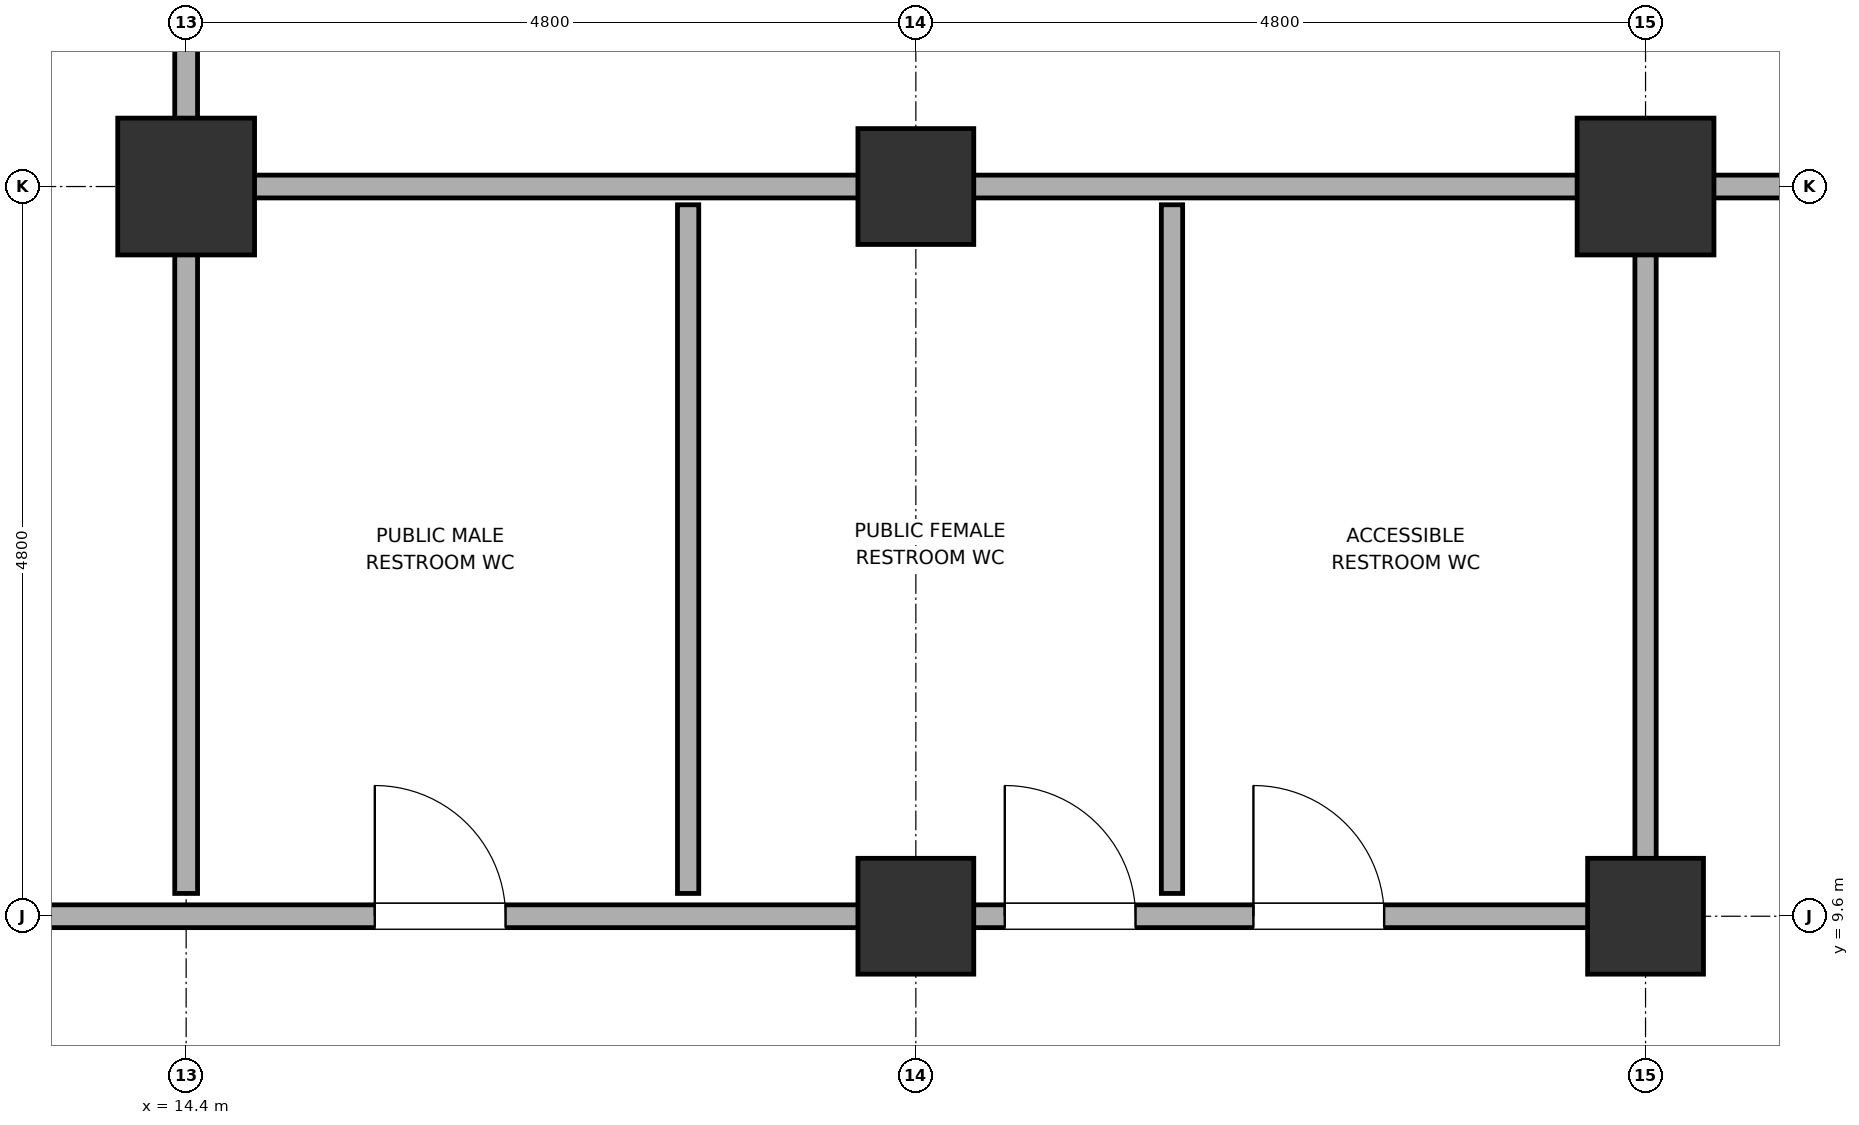
"""IFC4 building model, lengths in metres.
Left out: names, types, materials, properties, quantities, classifications, styles, units other than length and angle.
Written with IfcOpenShell. Run it as: python <this file> out.ifc"""

import sys

from ifc_helpers import new_model, si_unit, direction, frame, frame_2d, origin, origin_2d, place, context, subcontext, project, spatial, rectangle, hollow_rectangle, hollow_circle, extrude, element, fill, save


model = new_model("IFC4")
c1 = context("Model", 3, precision=1e-05, world=origin(), true_north=direction((0.0, 1.0)))
c2 = subcontext(c1, "Body", "Model", "MODEL_VIEW")
j1 = project(units=[si_unit("LENGTHUNIT", "METRE"), si_unit("PLANEANGLEUNIT", "RADIAN")], contexts=[c1])
p1 = place(None, origin())
s1 = spatial("IfcSite", under=j1, at=p1, CompositionType="ELEMENT")
p2 = place(p1, origin())
s2 = spatial("IfcBuilding", under=s1, at=p2, CompositionType="ELEMENT")
p3 = place(p2, frame((0.0, 0.0, 12.0)))
s3 = spatial("IfcBuildingStorey", under=s2, at=p3, CompositionType="ELEMENT", Elevation=12.0)
p4 = place(p3, frame((14.4, 14.4, 0.0), z_axis=(0.0, 0.0, 1.0), x_axis=(1.0, 0.0, 0.0)))
e1 = element("IfcColumn", 1, at=p4, inside=s3, PredefinedType="COLUMN", context=c2, shape_type="SweptSolid", body=[
    extrude(hollow_rectangle(XDim=0.9, YDim=0.9, WallThickness=0.04, at=origin_2d()), origin(), (0.0, 0.0, 1.0), 7.2),
])
for number, where, z_axis, x_axis in (
    (2, (19.2, 9.6, 0.0), (0.0, 0.0, 1.0), (1.0, 0.0, 0.0)),
    (3, (19.2, 14.4, 0.0), (0.0, 0.0, 1.0), (1.0, 0.0, 0.0)),
    (4, (24.0, 9.6, 0.0), (0.0, 0.0, 1.0), (1.0, 0.0, 0.0)),
):
    element("IfcColumn", number, at=place(p3, frame(where, z_axis=z_axis, x_axis=x_axis)), inside=s3, PredefinedType="COLUMN", context=c2, shape_type="SweptSolid", body=[
        extrude(hollow_circle(Radius=0.381, WallThickness=0.032, at=origin_2d()), origin(), (0.0, 0.0, 1.0), 7.2),
    ])
p5 = place(p3, frame((24.0, 14.4, 0.0), z_axis=(0.0, 0.0, 1.0), x_axis=(1.0, 0.0, 0.0)))
e5 = element("IfcColumn", 5, at=p5, inside=s3, PredefinedType="COLUMN", context=c2, shape_type="SweptSolid", body=[
    extrude(hollow_rectangle(XDim=0.9, YDim=0.9, WallThickness=0.04, at=origin_2d()), origin(), (0.0, 0.0, 1.0), 7.2),
])
p6 = place(p3, frame((-32.4, 9.6, 0.0), z_axis=(0.0, 0.0, 1.0), x_axis=(1.0, 0.0, 0.0)))
e6 = element("IfcWall", 6, at=p6, inside=s3, PredefinedType="PARTITIONING", context=c2, shape_type="SweptSolid", body=[
    extrude(rectangle(XDim=56.28, YDim=0.15, at=frame_2d((28.14, 0.0))), origin(), (0.0, 0.0, 1.0), 5.52),
])
p7 = place(p6, frame((15.15, 0.0, 0.0)))
e7 = element("IfcOpeningElement", 7, at=p7, cuts=e6, PredefinedType="OPENING", context=c2, shape_type="SweptSolid", body=[
    extrude(rectangle(XDim=0.9, YDim=2.1, at=frame_2d((0.45, 1.05))), frame((0.0, 0.09, 0.0), z_axis=(0.0, -1.0, 0.0), x_axis=(1.0, 0.0, 0.0)), (0.0, 0.0, 1.0), 0.18),
])
p8 = place(p6, frame((34.35, 0.0, 0.0)))
e8 = element("IfcOpeningElement", 8, at=p8, cuts=e6, PredefinedType="OPENING", context=c2, shape_type="SweptSolid", body=[
    extrude(rectangle(XDim=0.9, YDim=2.1, at=frame_2d((0.45, 1.05))), frame((0.0, 0.09, 0.0), z_axis=(0.0, -1.0, 0.0), x_axis=(1.0, 0.0, 0.0)), (0.0, 0.0, 1.0), 0.18),
])
p9 = place(p6, frame((48.041, 0.0, 0.0)))
e9 = element("IfcOpeningElement", 9, at=p9, cuts=e6, PredefinedType="OPENING", context=c2, shape_type="SweptSolid", body=[
    extrude(rectangle(XDim=0.86, YDim=2.1, at=frame_2d((0.43, 1.05))), frame((0.0, 0.09, 0.0), z_axis=(0.0, -1.0, 0.0), x_axis=(1.0, 0.0, 0.0)), (0.0, 0.0, 1.0), 0.18),
])
p10 = place(p6, frame((52.185, 0.0, 0.0)))
e10 = element("IfcOpeningElement", 10, at=p10, cuts=e6, PredefinedType="OPENING", context=c2, shape_type="SweptSolid", body=[
    extrude(rectangle(XDim=0.86, YDim=2.1, at=frame_2d((0.43, 1.05))), frame((0.0, 0.09, 0.0), z_axis=(0.0, -1.0, 0.0), x_axis=(1.0, 0.0, 0.0)), (0.0, 0.0, 1.0), 0.18),
])
p11 = place(p6, frame((53.821, 0.0, 0.0)))
e11 = element("IfcOpeningElement", 11, at=p11, cuts=e6, PredefinedType="OPENING", context=c2, shape_type="SweptSolid", body=[
    extrude(rectangle(XDim=0.86, YDim=2.1, at=frame_2d((0.43, 1.05))), frame((0.0, 0.09, 0.0), z_axis=(0.0, -1.0, 0.0), x_axis=(1.0, 0.0, 0.0)), (0.0, 0.0, 1.0), 0.18),
])
p12 = place(p3, frame((14.52, 14.4, 0.0), z_axis=(0.0, 0.0, 1.0), x_axis=(1.0, 0.0, 0.0)))
e12 = element("IfcWall", 12, at=p12, inside=s3, PredefinedType="PARTITIONING", context=c2, shape_type="SweptSolid", body=[
    extrude(rectangle(XDim=17.88, YDim=0.15, at=frame_2d((8.94, 0.0))), origin(), (0.0, 0.0, 1.0), 5.52),
])
p13 = place(p12, frame((11.43, 0.0, 0.0)))
e13 = element("IfcOpeningElement", 13, at=p13, cuts=e12, PredefinedType="OPENING", context=c2, shape_type="SweptSolid", body=[
    extrude(rectangle(XDim=0.9, YDim=2.1, at=frame_2d((0.45, 1.05))), frame((0.0, 0.09, 0.0), z_axis=(0.0, -1.0, 0.0), x_axis=(1.0, 0.0, 0.0)), (0.0, 0.0, 1.0), 0.18),
])
p14 = place(p3, frame((14.4, 9.75, 0.0), z_axis=(0.0, 0.0, 1.0), x_axis=(0.0, 1.0, 0.0)))
e14 = element("IfcWall", 14, at=p14, inside=s3, PredefinedType="PARTITIONING", context=c2, shape_type="SweptSolid", body=[
    extrude(rectangle(XDim=13.92, YDim=0.15, at=frame_2d((6.96, 0.0))), origin(), (0.0, 0.0, 1.0), 5.52),
])
for number, where, z_axis, x_axis in (
    (15, (17.702, 9.75, 0.0), (0.0, 0.0, 1.0), (0.0, 1.0, 0.0)),
    (16, (20.885, 9.75, 0.0), (0.0, 0.0, 1.0), (0.0, 1.0, 0.0)),
    (17, (24.0, 9.75, 0.0), (0.0, 0.0, 1.0), (0.0, 1.0, 0.0)),
):
    element("IfcWall", number, at=place(p3, frame(where, z_axis=z_axis, x_axis=x_axis)), inside=s3, PredefinedType="PLUMBINGWALL", context=c2, shape_type="SweptSolid", body=[
        extrude(rectangle(XDim=4.53, YDim=0.14, at=frame_2d((2.265, 0.0))), origin(), (0.0, 0.0, 1.0), 5.52),
    ])
p15 = place(p9, origin())
e18 = element("IfcDoor", 18, at=p15, inside=s3, OperationType="SINGLE_SWING_RIGHT", PredefinedType="DOOR", context=c2, shape_type="SweptSolid", body=[
    extrude(rectangle(XDim=0.86, YDim=2.1, at=frame_2d((0.43, 1.05))), frame((0.0, 0.025, 0.0), z_axis=(0.0, -1.0, 0.0), x_axis=(1.0, 0.0, 0.0)), (0.0, 0.0, 1.0), 0.05),
])
fill(e9, e18)
p16 = place(p10, origin())
e19 = element("IfcDoor", 19, at=p16, inside=s3, OperationType="SINGLE_SWING_LEFT", PredefinedType="DOOR", context=c2, shape_type="SweptSolid", body=[
    extrude(rectangle(XDim=0.86, YDim=2.1, at=frame_2d((0.43, 1.05))), frame((0.0, 0.025, 0.0), z_axis=(0.0, -1.0, 0.0), x_axis=(1.0, 0.0, 0.0)), (0.0, 0.0, 1.0), 0.05),
])
fill(e10, e19)
p17 = place(p11, origin())
e20 = element("IfcDoor", 20, at=p17, inside=s3, OperationType="SINGLE_SWING_LEFT", PredefinedType="DOOR", context=c2, shape_type="SweptSolid", body=[
    extrude(rectangle(XDim=0.86, YDim=2.1, at=frame_2d((0.43, 1.05))), frame((0.0, 0.025, 0.0), z_axis=(0.0, -1.0, 0.0), x_axis=(1.0, 0.0, 0.0)), (0.0, 0.0, 1.0), 0.05),
])
fill(e11, e20)
save(model, sys.argv[1])
